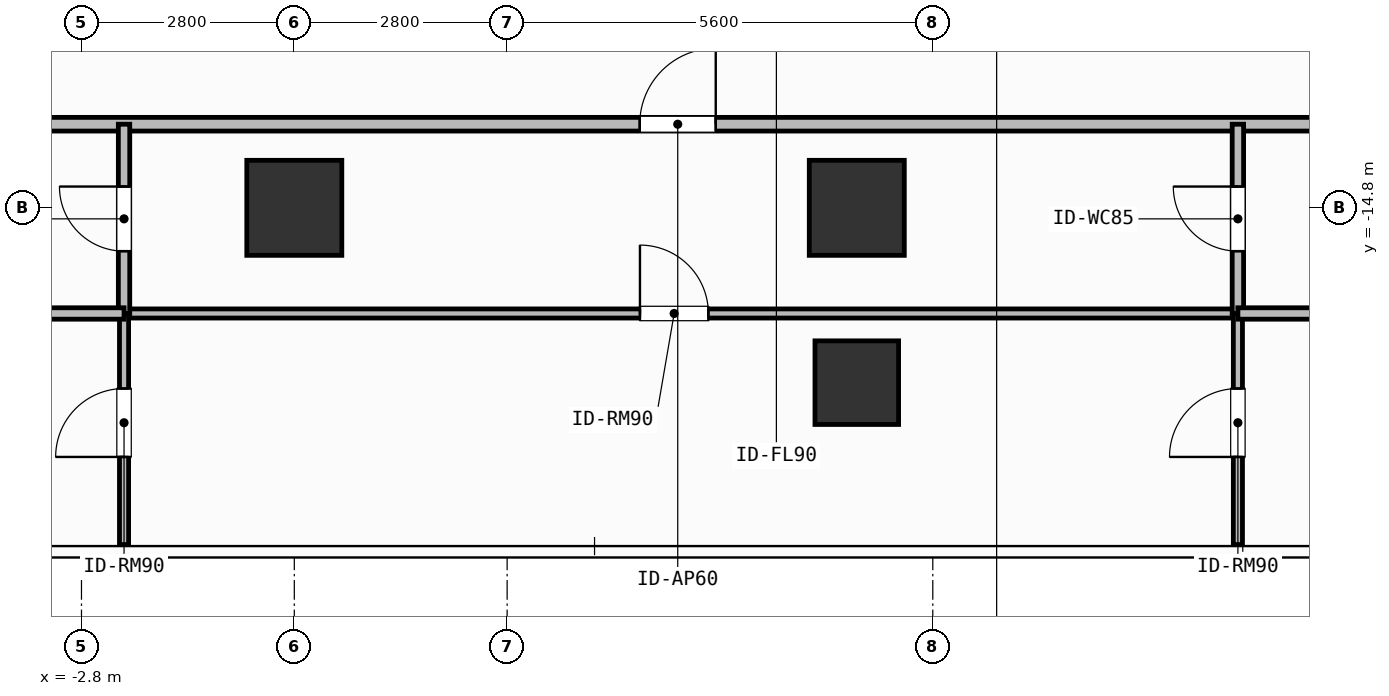
"""IFC4 building model, lengths in metres.
Left out: names, types, materials, properties, quantities, classifications, styles, units other than length and angle.
Written with IfcOpenShell. Run it as: python <this file> out.ifc"""

import sys

from ifc_helpers import new_model, si_unit, direction, frame, frame_2d, origin, origin_2d, place, context, subcontext, project, spatial, rectangle, extrude, element, fill, save


model = new_model("IFC4")
c1 = context("Model", 3, precision=1e-05, world=origin(), true_north=direction((0.0, 1.0)))
c2 = subcontext(c1, "Body", "Model", "MODEL_VIEW")
j1 = project(units=[si_unit("LENGTHUNIT", "METRE"), si_unit("PLANEANGLEUNIT", "RADIAN")], contexts=[c1])
p1 = place(None, origin())
s1 = spatial("IfcSite", under=j1, at=p1, CompositionType="ELEMENT")
p2 = place(p1, origin())
s2 = spatial("IfcBuilding", under=s1, at=p2, CompositionType="ELEMENT")
p3 = place(p2, frame((0.0, 0.0, 93.0)))
s3 = spatial("IfcBuildingStorey", under=s2, at=p3, CompositionType="ELEMENT", Elevation=93.0)
for number, where, z_axis, x_axis in (
    (1, (0.0, -14.8, 0.0), (0.0, 0.0, 1.0), (1.0, 0.0, 0.0)),
    (2, (7.4, -14.8, 0.0), (0.0, 0.0, 1.0), (1.0, 0.0, 0.0)),
):
    element("IfcColumn", number, at=place(p3, frame(where, z_axis=z_axis, x_axis=x_axis)), inside=s3, PredefinedType="COLUMN", context=c2, shape_type="SweptSolid", body=[
        extrude(rectangle(XDim=1.25, YDim=1.25, at=origin_2d()), origin(), (0.0, 0.0, 1.0), 3.9),
    ])
p4 = place(p3, frame((7.4, -17.1, 0.0), z_axis=(0.0, 0.0, 1.0), x_axis=(1.0, 0.0, 0.0)))
e3 = element("IfcColumn", 3, at=p4, inside=s3, PredefinedType="COLUMN", context=c2, shape_type="SweptSolid", body=[
    extrude(rectangle(XDim=1.1, YDim=1.1, at=origin_2d()), origin(), (0.0, 0.0, 1.0), 3.9),
])
p5 = place(p3, frame((-7.634, -13.7, 0.0), z_axis=(0.0, 0.0, 1.0), x_axis=(1.0, 0.0, 0.0)))
e4 = element("IfcWall", 4, at=p5, inside=s3, PredefinedType="PARTITIONING", context=c2, shape_type="SweptSolid", body=[
    extrude(rectangle(XDim=26.254, YDim=0.18, at=frame_2d((13.127, 0.0))), origin(), (0.0, 0.0, 1.0), 3.68),
])
p6 = place(p5, frame((12.178, 0.0, 0.0)))
e5 = element("IfcOpeningElement", 5, at=p6, cuts=e4, PredefinedType="OPENING", context=c2, shape_type="SweptSolid", body=[
    extrude(rectangle(XDim=1.0, YDim=2.2, at=frame_2d((0.5, 1.1))), frame((0.0, 0.1, 0.0), z_axis=(0.0, -1.0, 0.0), x_axis=(1.0, 0.0, 0.0)), (0.0, 0.0, 1.0), 0.2),
])
p7 = place(p3, frame((-2.24, -16.19, 0.0), z_axis=(0.0, 0.0, 1.0), x_axis=(1.0, 0.0, 0.0)))
e6 = element("IfcWall", 6, at=p7, inside=s3, PredefinedType="PARTITIONING", context=c2, shape_type="SweptSolid", body=[
    extrude(rectangle(XDim=14.654, YDim=0.12, at=frame_2d((7.327, 0.0))), origin(), (0.0, 0.0, 1.0), 3.68),
])
p8 = place(p7, frame((6.787, 0.0, 0.0)))
e7 = element("IfcOpeningElement", 7, at=p8, cuts=e6, PredefinedType="OPENING", context=c2, shape_type="SweptSolid", body=[
    extrude(rectangle(XDim=0.9, YDim=2.1, at=frame_2d((0.45, 1.05))), frame((0.0, 0.07, 0.0), z_axis=(0.0, -1.0, 0.0), x_axis=(1.0, 0.0, 0.0)), (0.0, 0.0, 1.0), 0.14),
])
p9 = place(p3, frame((-2.24, -16.19, 0.0), z_axis=(0.0, 0.0, 1.0), x_axis=(0.0, 1.0, 0.0)))
e8 = element("IfcWall", 8, at=p9, inside=s3, PredefinedType="PARTITIONING", context=c2, shape_type="SweptSolid", body=[
    extrude(rectangle(XDim=2.49, YDim=0.15, at=frame_2d((1.245, 0.0))), origin(), (0.0, 0.0, 1.0), 3.68),
])
p10 = place(p9, frame((0.82, 0.0, 0.0)))
e9 = element("IfcOpeningElement", 9, at=p10, cuts=e8, PredefinedType="OPENING", context=c2, shape_type="SweptSolid", body=[
    extrude(rectangle(XDim=0.85, YDim=2.1, at=frame_2d((0.425, 1.05))), frame((0.0, 0.085, 0.0), z_axis=(0.0, -1.0, 0.0), x_axis=(1.0, 0.0, 0.0)), (0.0, 0.0, 1.0), 0.17),
])
p11 = place(p3, frame((-2.24, -19.23, 0.0), z_axis=(0.0, 0.0, 1.0), x_axis=(0.0, 1.0, 0.0)))
e10 = element("IfcWall", 10, at=p11, inside=s3, PredefinedType="PARTITIONING", context=c2, shape_type="SweptSolid", body=[
    extrude(rectangle(XDim=3.04, YDim=0.12, at=frame_2d((1.52, 0.0))), origin(), (0.0, 0.0, 1.0), 3.68),
])
p12 = place(p11, frame((1.153, 0.0, 0.0)))
e11 = element("IfcOpeningElement", 11, at=p12, cuts=e10, PredefinedType="OPENING", context=c2, shape_type="SweptSolid", body=[
    extrude(rectangle(XDim=0.9, YDim=2.1, at=frame_2d((0.45, 1.05))), frame((0.0, 0.07, 0.0), z_axis=(0.0, -1.0, 0.0), x_axis=(1.0, 0.0, 0.0)), (0.0, 0.0, 1.0), 0.14),
])
p13 = place(p3, frame((12.414, -16.19, 0.0), z_axis=(0.0, 0.0, 1.0), x_axis=(0.0, 1.0, 0.0)))
e12 = element("IfcWall", 12, at=p13, inside=s3, PredefinedType="PARTITIONING", context=c2, shape_type="SweptSolid", body=[
    extrude(rectangle(XDim=2.49, YDim=0.15, at=frame_2d((1.245, 0.0))), origin(), (0.0, 0.0, 1.0), 3.68),
])
p14 = place(p13, frame((0.82, 0.0, 0.0)))
e13 = element("IfcOpeningElement", 13, at=p14, cuts=e12, PredefinedType="OPENING", context=c2, shape_type="SweptSolid", body=[
    extrude(rectangle(XDim=0.85, YDim=2.1, at=frame_2d((0.425, 1.05))), frame((0.0, 0.085, 0.0), z_axis=(0.0, -1.0, 0.0), x_axis=(1.0, 0.0, 0.0)), (0.0, 0.0, 1.0), 0.17),
])
p15 = place(p3, frame((12.414, -19.23, 0.0), z_axis=(0.0, 0.0, 1.0), x_axis=(0.0, 1.0, 0.0)))
e14 = element("IfcWall", 14, at=p15, inside=s3, PredefinedType="PARTITIONING", context=c2, shape_type="SweptSolid", body=[
    extrude(rectangle(XDim=3.04, YDim=0.12, at=frame_2d((1.52, 0.0))), origin(), (0.0, 0.0, 1.0), 3.68),
])
p16 = place(p15, frame((1.153, 0.0, 0.0)))
e15 = element("IfcOpeningElement", 15, at=p16, cuts=e14, PredefinedType="OPENING", context=c2, shape_type="SweptSolid", body=[
    extrude(rectangle(XDim=0.9, YDim=2.1, at=frame_2d((0.45, 1.05))), frame((0.0, 0.07, 0.0), z_axis=(0.0, -1.0, 0.0), x_axis=(1.0, 0.0, 0.0)), (0.0, 0.0, 1.0), 0.14),
])
p17 = place(p3, frame((-7.634, -16.19, 0.0), z_axis=(0.0, 0.0, 1.0), x_axis=(1.0, 0.0, 0.0)))
e16 = element("IfcWall", 16, at=p17, inside=s3, PredefinedType="PARTITIONING", context=c2, shape_type="SweptSolid", body=[
    extrude(rectangle(XDim=5.394, YDim=0.15, at=frame_2d((2.697, 0.0))), origin(), (0.0, 0.0, 1.0), 3.68),
])
p18 = place(p3, frame((12.414, -16.19, 0.0), z_axis=(0.0, 0.0, 1.0), x_axis=(1.0, 0.0, 0.0)))
e17 = element("IfcWall", 17, at=p18, inside=s3, PredefinedType="PARTITIONING", context=c2, shape_type="SweptSolid", body=[
    extrude(rectangle(XDim=6.206, YDim=0.15, at=frame_2d((3.103, 0.0))), origin(), (0.0, 0.0, 1.0), 3.68),
])
p19 = place(p6, origin())
e18 = element("IfcDoor", 18, at=p19, inside=s3, OperationType="SINGLE_SWING_RIGHT", PredefinedType="DOOR", context=c2, shape_type="SweptSolid", body=[
    extrude(rectangle(XDim=1.0, YDim=2.2, at=frame_2d((0.5, 1.1))), frame((0.0, 0.025, 0.0), z_axis=(0.0, -1.0, 0.0), x_axis=(1.0, 0.0, 0.0)), (0.0, 0.0, 1.0), 0.05),
])
fill(e5, e18)
p20 = place(p8, origin())
e19 = element("IfcDoor", 19, at=p20, inside=s3, OperationType="SINGLE_SWING_LEFT", PredefinedType="DOOR", context=c2, shape_type="SweptSolid", body=[
    extrude(rectangle(XDim=0.9, YDim=2.1, at=frame_2d((0.45, 1.05))), frame((0.0, 0.025, 0.0), z_axis=(0.0, -1.0, 0.0), x_axis=(1.0, 0.0, 0.0)), (0.0, 0.0, 1.0), 0.05),
])
fill(e7, e19)
p21 = place(p10, origin())
e20 = element("IfcDoor", 20, at=p21, inside=s3, OperationType="SINGLE_SWING_RIGHT", PredefinedType="DOOR", context=c2, shape_type="SweptSolid", body=[
    extrude(rectangle(XDim=0.85, YDim=2.1, at=frame_2d((0.425, 1.05))), frame((0.0, 0.025, 0.0), z_axis=(0.0, -1.0, 0.0), x_axis=(1.0, 0.0, 0.0)), (0.0, 0.0, 1.0), 0.05),
])
fill(e9, e20)
p22 = place(p12, origin())
e21 = element("IfcDoor", 21, at=p22, inside=s3, OperationType="SINGLE_SWING_LEFT", PredefinedType="DOOR", context=c2, shape_type="SweptSolid", body=[
    extrude(rectangle(XDim=0.9, YDim=2.1, at=frame_2d((0.45, 1.05))), frame((0.0, 0.025, 0.0), z_axis=(0.0, -1.0, 0.0), x_axis=(1.0, 0.0, 0.0)), (0.0, 0.0, 1.0), 0.05),
])
fill(e11, e21)
p23 = place(p14, origin())
e22 = element("IfcDoor", 22, at=p23, inside=s3, OperationType="SINGLE_SWING_RIGHT", PredefinedType="DOOR", context=c2, shape_type="SweptSolid", body=[
    extrude(rectangle(XDim=0.85, YDim=2.1, at=frame_2d((0.425, 1.05))), frame((0.0, 0.025, 0.0), z_axis=(0.0, -1.0, 0.0), x_axis=(1.0, 0.0, 0.0)), (0.0, 0.0, 1.0), 0.05),
])
fill(e13, e22)
p24 = place(p16, origin())
e23 = element("IfcDoor", 23, at=p24, inside=s3, OperationType="SINGLE_SWING_LEFT", PredefinedType="DOOR", context=c2, shape_type="SweptSolid", body=[
    extrude(rectangle(XDim=0.9, YDim=2.1, at=frame_2d((0.45, 1.05))), frame((0.0, 0.025, 0.0), z_axis=(0.0, -1.0, 0.0), x_axis=(1.0, 0.0, 0.0)), (0.0, 0.0, 1.0), 0.05),
])
fill(e15, e23)
save(model, sys.argv[1])
